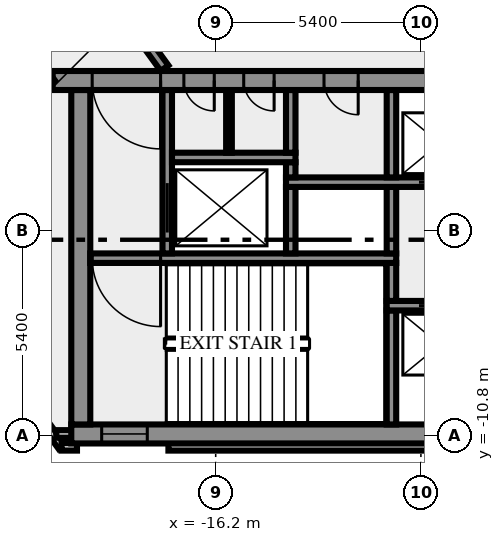
"""IFC4 building model, lengths in metres.
Left out: names, types, materials, properties, quantities, classifications, styles, units other than length and angle.
Written with IfcOpenShell. Run it as: python <this file> out.ifc"""

import sys

from ifc_helpers import new_model, si_unit, direction, frame, frame_2d, origin, place, context, subcontext, project, spatial, rectangle, extrude, element, fill, save


model = new_model("IFC4")
c1 = context("Model", 3, precision=1e-05, world=origin(), true_north=direction((0.0, 1.0)))
c2 = subcontext(c1, "Body", "Model", "MODEL_VIEW")
j1 = project(units=[si_unit("LENGTHUNIT", "METRE"), si_unit("PLANEANGLEUNIT", "RADIAN")], contexts=[c1])
p1 = place(None, origin())
s1 = spatial("IfcSite", under=j1, at=p1, CompositionType="ELEMENT")
p2 = place(p1, origin())
s2 = spatial("IfcBuilding", under=s1, at=p2, CompositionType="ELEMENT")
p3 = place(p2, frame((0.0, 0.0, 39.0)))
s3 = spatial("IfcBuildingStorey", under=s2, at=p3, CompositionType="ELEMENT", Elevation=39.0)
p4 = place(p3, frame((-21.833, -8.909, 0.0), z_axis=(0.0, 0.0, 1.0), x_axis=(0.587766567315, -0.809030569476, 0.0)))
e1 = element("IfcWall", 1, at=p4, inside=s3, PredefinedType="SOLIDWALL", context=c2, shape_type="SweptSolid", body=[
    extrude(rectangle(XDim=2.688, YDim=0.2, at=frame_2d((1.344, 0.0))), origin(), (0.0, 0.0, 1.0), 3.65),
])
p5 = place(p3, frame((-20.256, -11.088, 0.0), z_axis=(0.0, 0.0, 1.0), x_axis=(1.0, 0.0, 0.0)))
e2 = element("IfcWall", 2, at=p5, inside=s3, PredefinedType="SOLIDWALL", context=c2, shape_type="SweptSolid", body=[
    extrude(rectangle(XDim=0.406, YDim=0.2, at=frame_2d((0.203, 0.0))), origin(), (0.0, 0.0, 1.0), 3.65),
])
p6 = place(p3, frame((-17.444, -11.088, 0.0), z_axis=(0.0, 0.0, 1.0), x_axis=(1.0, 0.0, 0.0)))
e3 = element("IfcWall", 3, at=p6, inside=s3, PredefinedType="SOLIDWALL", context=c2, shape_type="SweptSolid", body=[
    extrude(rectangle(XDim=34.888, YDim=0.2, at=frame_2d((17.444, 0.0))), origin(), (0.0, 0.0, 1.0), 3.65),
])
p7 = place(p3, frame((-19.98, -10.75, 0.0), z_axis=(0.0, 0.0, 1.0), x_axis=(-1.0, 0.0, 0.0)))
e4 = element("IfcWall", 4, at=p7, inside=s3, PredefinedType="SOLIDWALL", context=c2, shape_type="SweptSolid", body=[
    extrude(rectangle(XDim=0.417, YDim=0.2, at=frame_2d((0.208, 0.0))), origin(), (0.0, 0.0, 1.0), 3.65),
])
p8 = place(p3, frame((-20.0, -10.75, 0.0), z_axis=(0.0, 0.0, 1.0), x_axis=(1.0, 0.0, 0.0)))
e5 = element("IfcWall", 5, at=p8, inside=s3, PredefinedType="SHEAR", context=c2, shape_type="SweptSolid", body=[
    extrude(rectangle(XDim=40.0, YDim=0.5, at=frame_2d((20.0, 0.0))), origin(), (0.0, 0.0, 1.0), 3.65),
])
p9 = place(p8, frame((0.8, 0.0, 1.0)))
e6 = element("IfcOpeningElement", 6, at=p9, cuts=e5, PredefinedType="OPENING", context=c2, shape_type="SweptSolid", body=[
    extrude(rectangle(XDim=1.2, YDim=1.2, at=frame_2d((0.6, 0.6))), frame((0.0, 0.26, 0.0), z_axis=(0.0, -1.0, 0.0), x_axis=(1.0, 0.0, 0.0)), (0.0, 0.0, 1.0), 0.52),
])
p10 = place(p8, frame((38.0, 0.0, 1.0)))
e7 = element("IfcOpeningElement", 7, at=p10, cuts=e5, PredefinedType="OPENING", context=c2, shape_type="SweptSolid", body=[
    extrude(rectangle(XDim=1.2, YDim=1.2, at=frame_2d((0.6, 0.6))), frame((0.0, 0.26, 0.0), z_axis=(0.0, -1.0, 0.0), x_axis=(1.0, 0.0, 0.0)), (0.0, 0.0, 1.0), 0.52),
])
p11 = place(p3, frame((-19.75, -10.5, 0.0), z_axis=(0.0, 0.0, 1.0), x_axis=(0.0, 1.0, 0.0)))
e8 = element("IfcWall", 8, at=p11, inside=s3, PredefinedType="SHEAR", context=c2, shape_type="SweptSolid", body=[
    extrude(rectangle(XDim=8.8, YDim=0.5, at=frame_2d((4.4, 0.0))), origin(), (0.0, 0.0, 1.0), 3.65),
])
p12 = place(p3, frame((-11.575, -10.5, 0.0), z_axis=(0.0, 0.0, 1.0), x_axis=(0.0, 1.0, 0.0)))
e9 = element("IfcWall", 9, at=p12, inside=s3, PredefinedType="SHEAR", context=c2, shape_type="SweptSolid", body=[
    extrude(rectangle(XDim=3.0, YDim=0.25, at=frame_2d((1.5, 0.0))), origin(), (0.0, 0.0, 1.0), 3.65),
])
p13 = place(p3, frame((11.7, -7.375, 0.0), z_axis=(0.0, 0.0, 1.0), x_axis=(-1.0, 0.0, 0.0)))
e10 = element("IfcWall", 10, at=p13, inside=s3, PredefinedType="SHEAR", context=c2, shape_type="SweptSolid", body=[
    extrude(rectangle(XDim=23.4, YDim=0.25, at=frame_2d((11.7, 0.0))), origin(), (0.0, 0.0, 1.0), 3.65),
])
p14 = place(p13, frame((21.45, 0.0, 0.0)))
e11 = element("IfcOpeningElement", 11, at=p14, cuts=e10, PredefinedType="OPENING", context=c2, shape_type="SweptSolid", body=[
    extrude(rectangle(XDim=1.1, YDim=2.1, at=frame_2d((0.55, 1.05))), frame((0.0, 0.135, 0.0), z_axis=(0.0, -1.0, 0.0), x_axis=(1.0, 0.0, 0.0)), (0.0, 0.0, 1.0), 0.27),
])
p15 = place(p13, frame((18.95, 0.0, 0.0)))
e12 = element("IfcOpeningElement", 12, at=p15, cuts=e10, PredefinedType="OPENING", context=c2, shape_type="SweptSolid", body=[
    extrude(rectangle(XDim=1.1, YDim=2.1, at=frame_2d((0.55, 1.05))), frame((0.0, 0.135, 0.0), z_axis=(0.0, -1.0, 0.0), x_axis=(1.0, 0.0, 0.0)), (0.0, 0.0, 1.0), 0.27),
])
p16 = place(p13, frame((16.45, 0.0, 0.0)))
e13 = element("IfcOpeningElement", 13, at=p16, cuts=e10, PredefinedType="OPENING", context=c2, shape_type="SweptSolid", body=[
    extrude(rectangle(XDim=1.1, YDim=2.1, at=frame_2d((0.55, 1.05))), frame((0.0, 0.135, 0.0), z_axis=(0.0, -1.0, 0.0), x_axis=(1.0, 0.0, 0.0)), (0.0, 0.0, 1.0), 0.27),
])
p17 = place(p13, frame((14.4, 0.0, 0.0)))
e14 = element("IfcOpeningElement", 14, at=p17, cuts=e10, PredefinedType="OPENING", context=c2, shape_type="SweptSolid", body=[
    extrude(rectangle(XDim=0.9, YDim=2.1, at=frame_2d((0.45, 1.05))), frame((0.0, 0.135, 0.0), z_axis=(0.0, -1.0, 0.0), x_axis=(1.0, 0.0, 0.0)), (0.0, 0.0, 1.0), 0.27),
])
p18 = place(p13, frame((12.5, 0.0, 0.0)))
e15 = element("IfcOpeningElement", 15, at=p18, cuts=e10, PredefinedType="OPENING", context=c2, shape_type="SweptSolid", body=[
    extrude(rectangle(XDim=0.9, YDim=2.1, at=frame_2d((0.45, 1.05))), frame((0.0, 0.135, 0.0), z_axis=(0.0, -1.0, 0.0), x_axis=(1.0, 0.0, 0.0)), (0.0, 0.0, 1.0), 0.27),
])
p19 = place(p13, frame((10.6, 0.0, 0.0)))
e16 = element("IfcOpeningElement", 16, at=p19, cuts=e10, PredefinedType="OPENING", context=c2, shape_type="SweptSolid", body=[
    extrude(rectangle(XDim=0.9, YDim=2.1, at=frame_2d((0.45, 1.05))), frame((0.0, 0.135, 0.0), z_axis=(0.0, -1.0, 0.0), x_axis=(1.0, 0.0, 0.0)), (0.0, 0.0, 1.0), 0.27),
])
p20 = place(p3, frame((-11.575, -7.25, 0.0), z_axis=(0.0, 0.0, 1.0), x_axis=(0.0, 1.0, 0.0)))
e17 = element("IfcWall", 17, at=p20, inside=s3, PredefinedType="SHEAR", context=c2, shape_type="SweptSolid", body=[
    extrude(rectangle(XDim=1.0, YDim=0.25, at=frame_2d((0.5, 0.0))), origin(), (0.0, 0.0, 1.0), 3.65),
])
p21 = place(p3, frame((-11.45, -6.125, 0.0), z_axis=(0.0, 0.0, 1.0), x_axis=(-1.0, 0.0, 0.0)))
e18 = element("IfcWall", 18, at=p21, inside=s3, PredefinedType="SHEAR", context=c2, shape_type="SweptSolid", body=[
    extrude(rectangle(XDim=8.05, YDim=0.25, at=frame_2d((4.025, 0.0))), origin(), (0.0, 0.0, 1.0), 3.65),
])
p22 = place(p21, frame((6.2, 0.0, 0.0)))
e19 = element("IfcOpeningElement", 19, at=p22, cuts=e18, PredefinedType="OPENING", context=c2, shape_type="SweptSolid", body=[
    extrude(rectangle(XDim=1.8, YDim=2.1, at=frame_2d((0.9, 1.05))), frame((0.0, 0.135, 0.0), z_axis=(0.0, -1.0, 0.0), x_axis=(1.0, 0.0, 0.0)), (0.0, 0.0, 1.0), 0.27),
])
p23 = place(p3, frame((-17.475, -6.0, 0.0), z_axis=(0.0, 0.0, 1.0), x_axis=(0.0, 1.0, 0.0)))
e20 = element("IfcWall", 20, at=p23, inside=s3, PredefinedType="SHEAR", context=c2, shape_type="SweptSolid", body=[
    extrude(rectangle(XDim=4.3, YDim=0.25, at=frame_2d((2.15, 0.0))), origin(), (0.0, 0.0, 1.0), 3.65),
])
p24 = place(p23, frame((0.55, 0.0, 0.0)))
e21 = element("IfcOpeningElement", 21, at=p24, cuts=e20, PredefinedType="OPENING", context=c2, shape_type="SweptSolid", body=[
    extrude(rectangle(XDim=1.3, YDim=2.1, at=frame_2d((0.65, 1.05))), frame((0.0, 0.135, 0.0), z_axis=(0.0, -1.0, 0.0), x_axis=(1.0, 0.0, 0.0)), (0.0, 0.0, 1.0), 0.27),
])
for number, where, z_axis, x_axis in (
    (22, (-14.225, -6.0, 0.0), (0.0, 0.0, 1.0), (0.0, 1.0, 0.0)),
    (23, (-11.575, -6.0, 0.0), (0.0, 0.0, 1.0), (0.0, 1.0, 0.0)),
):
    element("IfcWall", number, at=place(p3, frame(where, z_axis=z_axis, x_axis=x_axis)), inside=s3, PredefinedType="SHEAR", context=c2, shape_type="SweptSolid", body=[
        extrude(rectangle(XDim=1.75, YDim=0.25, at=frame_2d((0.875, 0.0))), origin(), (0.0, 0.0, 1.0), 3.65),
    ])
p25 = place(p3, frame((-14.35, -4.125, 0.0), z_axis=(0.0, 0.0, 1.0), x_axis=(1.0, 0.0, 0.0)))
e24 = element("IfcWall", 24, at=p25, inside=s3, PredefinedType="SHEAR", context=c2, shape_type="SweptSolid", body=[
    extrude(rectangle(XDim=10.4, YDim=0.25, at=frame_2d((5.2, 0.0))), origin(), (0.0, 0.0, 1.0), 3.65),
])
p26 = place(p25, frame((3.5, 0.0, 0.0)))
e25 = element("IfcOpeningElement", 25, at=p26, cuts=e24, PredefinedType="OPENING", context=c2, shape_type="SweptSolid", body=[
    extrude(rectangle(XDim=1.1, YDim=2.1, at=frame_2d((0.55, 1.05))), frame((0.0, 0.135, 0.0), z_axis=(0.0, -1.0, 0.0), x_axis=(1.0, 0.0, 0.0)), (0.0, 0.0, 1.0), 0.27),
])
p27 = place(p25, frame((6.0, 0.0, 0.0)))
e26 = element("IfcOpeningElement", 26, at=p27, cuts=e24, PredefinedType="OPENING", context=c2, shape_type="SweptSolid", body=[
    extrude(rectangle(XDim=1.1, YDim=2.1, at=frame_2d((0.55, 1.05))), frame((0.0, 0.135, 0.0), z_axis=(0.0, -1.0, 0.0), x_axis=(1.0, 0.0, 0.0)), (0.0, 0.0, 1.0), 0.27),
])
p28 = place(p25, frame((8.5, 0.0, 0.0)))
e27 = element("IfcOpeningElement", 27, at=p28, cuts=e24, PredefinedType="OPENING", context=c2, shape_type="SweptSolid", body=[
    extrude(rectangle(XDim=1.1, YDim=2.1, at=frame_2d((0.55, 1.05))), frame((0.0, 0.135, 0.0), z_axis=(0.0, -1.0, 0.0), x_axis=(1.0, 0.0, 0.0)), (0.0, 0.0, 1.0), 0.27),
])
p29 = place(p3, frame((-14.225, -4.0, 0.0), z_axis=(0.0, 0.0, 1.0), x_axis=(0.0, 1.0, 0.0)))
e28 = element("IfcWall", 28, at=p29, inside=s3, PredefinedType="SHEAR", context=c2, shape_type="SweptSolid", body=[
    extrude(rectangle(XDim=0.4, YDim=0.25, at=frame_2d((0.2, 0.0))), origin(), (0.0, 0.0, 1.0), 3.65),
])
p30 = place(p3, frame((-11.575, -4.0, 0.0), z_axis=(0.0, 0.0, 1.0), x_axis=(0.0, 1.0, 0.0)))
e29 = element("IfcWall", 29, at=p30, inside=s3, PredefinedType="SHEAR", context=c2, shape_type="SweptSolid", body=[
    extrude(rectangle(XDim=2.3, YDim=0.25, at=frame_2d((1.15, 0.0))), origin(), (0.0, 0.0, 1.0), 3.65),
])
p31 = place(p3, frame((-17.35, -3.475, 0.0), z_axis=(0.0, 0.0, 1.0), x_axis=(1.0, 0.0, 0.0)))
e30 = element("IfcWall", 30, at=p31, inside=s3, PredefinedType="SHEAR", context=c2, shape_type="SweptSolid", body=[
    extrude(rectangle(XDim=3.25, YDim=0.25, at=frame_2d((1.625, 0.0))), origin(), (0.0, 0.0, 1.0), 3.65),
])
p32 = place(p3, frame((-15.85, -3.35, 0.0), z_axis=(0.0, 0.0, 1.0), x_axis=(0.0, 1.0, 0.0)))
e31 = element("IfcWall", 31, at=p32, inside=s3, PredefinedType="PARTITIONING", context=c2, shape_type="SweptSolid", body=[
    extrude(rectangle(XDim=1.65, YDim=0.15, at=frame_2d((0.825, 0.0))), origin(), (0.0, 0.0, 1.0), 3.65),
])
p33 = place(p3, frame((-14.225, -3.35, 0.0), z_axis=(0.0, 0.0, 1.0), x_axis=(0.0, 1.0, 0.0)))
e32 = element("IfcWall", 32, at=p33, inside=s3, PredefinedType="SHEAR", context=c2, shape_type="SweptSolid", body=[
    extrude(rectangle(XDim=1.65, YDim=0.25, at=frame_2d((0.825, 0.0))), origin(), (0.0, 0.0, 1.0), 3.65),
])
p34 = place(p3, frame((20.49, -1.45, 0.0), z_axis=(0.0, 0.0, 1.0), x_axis=(-1.0, 0.0, 0.0)))
e33 = element("IfcWall", 33, at=p34, inside=s3, PredefinedType="SHEAR", context=c2, shape_type="SweptSolid", body=[
    extrude(rectangle(XDim=40.98, YDim=0.5, at=frame_2d((20.49, 0.0))), origin(), (0.0, 0.0, 1.0), 3.65),
])
p35 = place(p34, frame((38.14, 0.0, 0.0)))
e34 = element("IfcOpeningElement", 34, at=p35, cuts=e33, PredefinedType="OPENING", context=c2, shape_type="SweptSolid", body=[
    extrude(rectangle(XDim=1.8, YDim=2.1, at=frame_2d((0.9, 1.05))), frame((0.0, 0.26, 0.0), z_axis=(0.0, -1.0, 0.0), x_axis=(1.0, 0.0, 0.0)), (0.0, 0.0, 1.0), 0.52),
])
p36 = place(p34, frame((36.728, 0.0, 0.0)))
e35 = element("IfcOpeningElement", 35, at=p36, cuts=e33, PredefinedType="OPENING", context=c2, shape_type="SweptSolid", body=[
    extrude(rectangle(XDim=0.8, YDim=2.1, at=frame_2d((0.4, 1.05))), frame((0.0, 0.26, 0.0), z_axis=(0.0, -1.0, 0.0), x_axis=(1.0, 0.0, 0.0)), (0.0, 0.0, 1.0), 0.52),
])
p37 = place(p34, frame((35.153, 0.0, 0.0)))
e36 = element("IfcOpeningElement", 36, at=p37, cuts=e33, PredefinedType="OPENING", context=c2, shape_type="SweptSolid", body=[
    extrude(rectangle(XDim=0.8, YDim=2.1, at=frame_2d((0.4, 1.05))), frame((0.0, 0.26, 0.0), z_axis=(0.0, -1.0, 0.0), x_axis=(1.0, 0.0, 0.0)), (0.0, 0.0, 1.0), 0.52),
])
p38 = place(p34, frame((32.94, 0.0, 0.0)))
e37 = element("IfcOpeningElement", 37, at=p38, cuts=e33, PredefinedType="OPENING", context=c2, shape_type="SweptSolid", body=[
    extrude(rectangle(XDim=0.9, YDim=2.1, at=frame_2d((0.45, 1.05))), frame((0.0, 0.26, 0.0), z_axis=(0.0, -1.0, 0.0), x_axis=(1.0, 0.0, 0.0)), (0.0, 0.0, 1.0), 0.52),
])
p39 = place(p34, frame((21.765, 0.0, 0.0)))
e38 = element("IfcOpeningElement", 38, at=p39, cuts=e33, PredefinedType="OPENING", context=c2, shape_type="SweptSolid", body=[
    extrude(rectangle(XDim=2.0, YDim=2.1, at=frame_2d((1.0, 1.05))), frame((0.0, 0.26, 0.0), z_axis=(0.0, -1.0, 0.0), x_axis=(1.0, 0.0, 0.0)), (0.0, 0.0, 1.0), 0.52),
])
p40 = place(p34, frame((7.14, 0.0, 0.0)))
e39 = element("IfcOpeningElement", 39, at=p40, cuts=e33, PredefinedType="OPENING", context=c2, shape_type="SweptSolid", body=[
    extrude(rectangle(XDim=0.9, YDim=2.1, at=frame_2d((0.45, 1.05))), frame((0.0, 0.26, 0.0), z_axis=(0.0, -1.0, 0.0), x_axis=(1.0, 0.0, 0.0)), (0.0, 0.0, 1.0), 0.52),
])
p41 = place(p34, frame((4.19, 0.0, 0.0)))
e40 = element("IfcOpeningElement", 40, at=p41, cuts=e33, PredefinedType="OPENING", context=c2, shape_type="SweptSolid", body=[
    extrude(rectangle(XDim=0.9, YDim=2.1, at=frame_2d((0.45, 1.05))), frame((0.0, 0.26, 0.0), z_axis=(0.0, -1.0, 0.0), x_axis=(1.0, 0.0, 0.0)), (0.0, 0.0, 1.0), 0.52),
])
p42 = place(p34, frame((1.04, 0.0, 0.0)))
e41 = element("IfcOpeningElement", 41, at=p42, cuts=e33, PredefinedType="OPENING", context=c2, shape_type="SweptSolid", body=[
    extrude(rectangle(XDim=1.8, YDim=2.1, at=frame_2d((0.9, 1.05))), frame((0.0, 0.26, 0.0), z_axis=(0.0, -1.0, 0.0), x_axis=(1.0, 0.0, 0.0)), (0.0, 0.0, 1.0), 0.52),
])
p43 = place(p3, frame((-20.531, -1.523, 0.0), z_axis=(0.0, 0.0, 1.0), x_axis=(-0.587784593204, 0.809017473231, 0.0)))
e42 = element("IfcWall", 42, at=p43, inside=s3, PredefinedType="SOLIDWALL", context=c2, shape_type="SweptSolid", body=[
    extrude(rectangle(XDim=44.67, YDim=0.25, at=frame_2d((22.335, 0.0))), origin(), (0.0, 0.0, 1.0), 3.65),
])
p44 = place(p43, frame((30.765, 0.0, 0.0)))
e43 = element("IfcOpeningElement", 43, at=p44, cuts=e42, PredefinedType="OPENING", context=c2, shape_type="SweptSolid", body=[
    extrude(rectangle(XDim=0.9, YDim=2.1, at=frame_2d((0.45, 1.05))), frame((0.0, 0.135, 0.0), z_axis=(0.0, -1.0, 0.0), x_axis=(1.0, 0.0, 0.0)), (0.0, 0.0, 1.0), 0.27),
])
p45 = place(p43, frame((14.316, 0.0, 0.0)))
e44 = element("IfcOpeningElement", 44, at=p45, cuts=e42, PredefinedType="OPENING", context=c2, shape_type="SweptSolid", body=[
    extrude(rectangle(XDim=0.9, YDim=2.1, at=frame_2d((0.45, 1.05))), frame((0.0, 0.135, 0.0), z_axis=(0.0, -1.0, 0.0), x_axis=(1.0, 0.0, 0.0)), (0.0, 0.0, 1.0), 0.27),
])
p46 = place(p43, frame((29.166, 0.0, 0.0)))
e45 = element("IfcOpeningElement", 45, at=p46, cuts=e42, PredefinedType="OPENING", context=c2, shape_type="SweptSolid", body=[
    extrude(rectangle(XDim=0.9, YDim=2.1, at=frame_2d((0.45, 1.05))), frame((0.0, 0.135, 0.0), z_axis=(0.0, -1.0, 0.0), x_axis=(1.0, 0.0, 0.0)), (0.0, 0.0, 1.0), 0.27),
])
p47 = place(p3, frame((-37.232, 25.972, 0.0), z_axis=(0.0, 0.0, 1.0), x_axis=(0.587786323093, -0.809016216391, 0.0)))
e46 = element("IfcWall", 46, at=p47, inside=s3, PredefinedType="SOLIDWALL", context=c2, shape_type="SweptSolid", body=[
    extrude(rectangle(XDim=33.493, YDim=0.25, at=frame_2d((16.747, 0.0))), origin(), (0.0, 0.0, 1.0), 3.65),
])
p48 = place(p47, frame((8.335, 0.0, 0.0)))
e47 = element("IfcOpeningElement", 47, at=p48, cuts=e46, PredefinedType="OPENING", context=c2, shape_type="SweptSolid", body=[
    extrude(rectangle(XDim=0.9, YDim=2.1, at=frame_2d((0.45, 1.05))), frame((0.0, 0.135, 0.0), z_axis=(0.0, -1.0, 0.0), x_axis=(1.0, 0.0, 0.0)), (0.0, 0.0, 1.0), 0.27),
])
p49 = place(p47, frame((29.152, 0.0, 0.0)))
e48 = element("IfcOpeningElement", 48, at=p49, cuts=e46, PredefinedType="OPENING", context=c2, shape_type="SweptSolid", body=[
    extrude(rectangle(XDim=0.9, YDim=2.1, at=frame_2d((0.45, 1.05))), frame((0.0, 0.135, 0.0), z_axis=(0.0, -1.0, 0.0), x_axis=(1.0, 0.0, 0.0)), (0.0, 0.0, 1.0), 0.27),
])
p50 = place(p47, frame((6.735, 0.0, 0.0)))
e49 = element("IfcOpeningElement", 49, at=p50, cuts=e46, PredefinedType="OPENING", context=c2, shape_type="SweptSolid", body=[
    extrude(rectangle(XDim=0.9, YDim=2.1, at=frame_2d((0.45, 1.05))), frame((0.0, 0.135, 0.0), z_axis=(0.0, -1.0, 0.0), x_axis=(1.0, 0.0, 0.0)), (0.0, 0.0, 1.0), 0.27),
])
p51 = place(p9, origin())
e50 = element("IfcWindow", 50, at=p51, inside=s3, PartitioningType="SINGLE_PANEL", PredefinedType="WINDOW", context=c2, shape_type="SweptSolid", body=[
    extrude(rectangle(XDim=1.2, YDim=1.2, at=frame_2d((0.6, 0.6))), frame((0.0, 0.03, 0.0), z_axis=(0.0, -1.0, 0.0), x_axis=(1.0, 0.0, 0.0)), (0.0, 0.0, 1.0), 0.06),
])
fill(e6, e50)
p52 = place(p14, origin())
e51 = element("IfcDoor", 51, at=p52, inside=s3, OperationType="DOUBLE_DOOR_SLIDING", PredefinedType="DOOR", context=c2, shape_type="SweptSolid", body=[
    extrude(rectangle(XDim=1.1, YDim=2.1, at=frame_2d((0.55, 1.05))), frame((0.0, 0.025, 0.0), z_axis=(0.0, -1.0, 0.0), x_axis=(1.0, 0.0, 0.0)), (0.0, 0.0, 1.0), 0.05),
])
fill(e11, e51)
p53 = place(p22, origin())
e52 = element("IfcDoor", 52, at=p53, inside=s3, OperationType="DOUBLE_DOOR_SINGLE_SWING", PredefinedType="DOOR", context=c2, shape_type="SweptSolid", body=[
    extrude(rectangle(XDim=1.8, YDim=2.1, at=frame_2d((0.9, 1.05))), frame((0.0, 0.025, 0.0), z_axis=(0.0, -1.0, 0.0), x_axis=(1.0, 0.0, 0.0)), (0.0, 0.0, 1.0), 0.05),
])
fill(e19, e52)
p54 = place(p24, origin())
e53 = element("IfcDoor", 53, at=p54, inside=s3, OperationType="DOUBLE_DOOR_SLIDING", PredefinedType="DOOR", context=c2, shape_type="SweptSolid", body=[
    extrude(rectangle(XDim=1.3, YDim=2.1, at=frame_2d((0.65, 1.05))), frame((0.0, 0.025, 0.0), z_axis=(0.0, -1.0, 0.0), x_axis=(1.0, 0.0, 0.0)), (0.0, 0.0, 1.0), 0.05),
])
fill(e21, e53)
p55 = place(p26, origin())
e54 = element("IfcDoor", 54, at=p55, inside=s3, OperationType="DOUBLE_DOOR_SLIDING", PredefinedType="DOOR", context=c2, shape_type="SweptSolid", body=[
    extrude(rectangle(XDim=1.1, YDim=2.1, at=frame_2d((0.55, 1.05))), frame((0.0, 0.025, 0.0), z_axis=(0.0, -1.0, 0.0), x_axis=(1.0, 0.0, 0.0)), (0.0, 0.0, 1.0), 0.05),
])
fill(e25, e54)
p56 = place(p35, origin())
e55 = element("IfcDoor", 55, at=p56, inside=s3, OperationType="DOUBLE_DOOR_SINGLE_SWING", PredefinedType="DOOR", context=c2, shape_type="SweptSolid", body=[
    extrude(rectangle(XDim=1.8, YDim=2.1, at=frame_2d((0.9, 1.05))), frame((0.0, 0.025, 0.0), z_axis=(0.0, -1.0, 0.0), x_axis=(1.0, 0.0, 0.0)), (0.0, 0.0, 1.0), 0.05),
])
fill(e34, e55)
p57 = place(p36, origin())
e56 = element("IfcDoor", 56, at=p57, inside=s3, OperationType="SINGLE_SWING_RIGHT", PredefinedType="DOOR", context=c2, shape_type="SweptSolid", body=[
    extrude(rectangle(XDim=0.8, YDim=2.1, at=frame_2d((0.4, 1.05))), frame((0.0, 0.025, 0.0), z_axis=(0.0, -1.0, 0.0), x_axis=(1.0, 0.0, 0.0)), (0.0, 0.0, 1.0), 0.05),
])
fill(e35, e56)
p58 = place(p37, origin())
e57 = element("IfcDoor", 57, at=p58, inside=s3, OperationType="SINGLE_SWING_RIGHT", PredefinedType="DOOR", context=c2, shape_type="SweptSolid", body=[
    extrude(rectangle(XDim=0.8, YDim=2.1, at=frame_2d((0.4, 1.05))), frame((0.0, 0.025, 0.0), z_axis=(0.0, -1.0, 0.0), x_axis=(1.0, 0.0, 0.0)), (0.0, 0.0, 1.0), 0.05),
])
fill(e36, e57)
p59 = place(p38, origin())
e58 = element("IfcDoor", 58, at=p59, inside=s3, OperationType="SINGLE_SWING_RIGHT", PredefinedType="DOOR", context=c2, shape_type="SweptSolid", body=[
    extrude(rectangle(XDim=0.9, YDim=2.1, at=frame_2d((0.45, 1.05))), frame((0.0, 0.025, 0.0), z_axis=(0.0, -1.0, 0.0), x_axis=(1.0, 0.0, 0.0)), (0.0, 0.0, 1.0), 0.05),
])
fill(e37, e58)
save(model, sys.argv[1])
